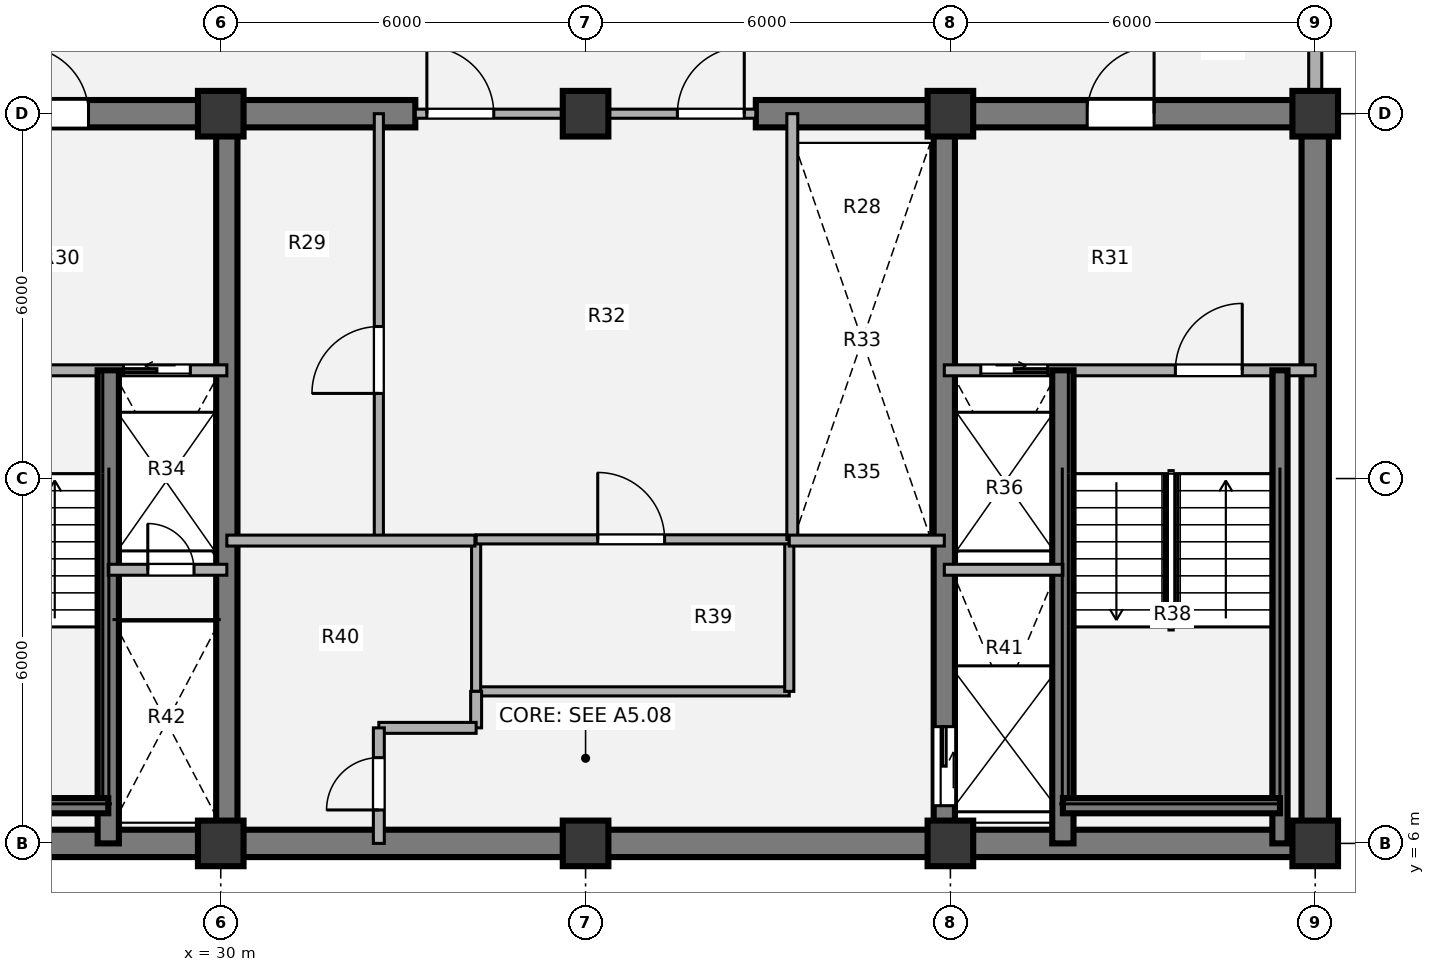
"""IFC4 building model, lengths in metres.
Left out: names, types, materials, properties, quantities, classifications, styles, units other than length and angle.
Written with IfcOpenShell. Run it as: python <this file> out.ifc"""

import sys

from ifc_helpers import new_model, si_unit, direction, frame, frame_2d, origin, origin_2d, place, context, subcontext, project, spatial, rectangle, extrude, source, transform, mapped, element, fill, save


model = new_model("IFC4")
c1 = context("Model", 3, precision=1e-05, world=origin(), true_north=direction((0.0, 1.0)))
c2 = subcontext(c1, "Body", "Model", "MODEL_VIEW")
j1 = project(units=[si_unit("LENGTHUNIT", "METRE"), si_unit("PLANEANGLEUNIT", "RADIAN")], contexts=[c1])
p1 = place(None, origin())
s1 = spatial("IfcSite", under=j1, at=p1, CompositionType="ELEMENT")
p2 = place(p1, origin())
s2 = spatial("IfcBuilding", under=s1, at=p2, CompositionType="ELEMENT")
p3 = place(p2, frame((0.0, 0.0, 201.78)))
s3 = spatial("IfcBuildingStorey", under=s2, at=p3, CompositionType="ELEMENT", Elevation=201.78)
m1 = source(origin(), c2, "Body", "SweptSolid", [
    extrude(rectangle(XDim=0.75, YDim=0.75, at=origin_2d()), origin(), (0.0, 0.0, 1.0), 3.78),
])
for number, where, z_axis, x_axis in (
    (1, (30.0, 6.0, 0.0), (0.0, 0.0, 1.0), (1.0, 0.0, 0.0)),
    (2, (36.0, 6.0, 0.0), (0.0, 0.0, 1.0), (1.0, 0.0, 0.0)),
    (3, (42.0, 6.0, 0.0), (0.0, 0.0, 1.0), (1.0, 0.0, 0.0)),
    (4, (48.0, 6.0, 0.0), (0.0, 0.0, 1.0), (1.0, 0.0, 0.0)),
    (5, (30.0, 18.0, 0.0), (0.0, 0.0, 1.0), (1.0, 0.0, 0.0)),
    (6, (36.0, 18.0, 0.0), (0.0, 0.0, 1.0), (1.0, 0.0, 0.0)),
    (7, (42.0, 18.0, 0.0), (0.0, 0.0, 1.0), (1.0, 0.0, 0.0)),
    (8, (48.0, 18.0, 0.0), (0.0, 0.0, 1.0), (1.0, 0.0, 0.0)),
):
    element("IfcColumn", number, at=place(p3, frame(where, z_axis=z_axis, x_axis=x_axis)), inside=s3, PredefinedType="COLUMN", context=c2, shape_type="MappedRepresentation", body=[
        mapped(m1, transform((0.0, 0.0, 0.0), x_axis=(1.0, 0.0, 0.0), y_axis=(0.0, 1.0, 0.0), z_axis=(0.0, 0.0, 1.0), scale=1.0)),
    ])
p4 = place(p3, frame((48.225, 6.0, 0.0), z_axis=(0.0, 0.0, 1.0), x_axis=(-1.0, 0.0, 0.0)))
e9 = element("IfcWall", 9, at=p4, inside=s3, PredefinedType="SHEAR", context=c2, shape_type="SweptSolid", body=[
    extrude(rectangle(XDim=24.45, YDim=0.45, at=frame_2d((12.225, 0.0))), origin(), (0.0, 0.0, 1.0), 3.78),
])
p5 = place(p3, frame((48.0, 18.0, 0.0), z_axis=(0.0, 0.0, 1.0), x_axis=(0.0, -1.0, 0.0)))
e10 = element("IfcWall", 10, at=p5, inside=s3, PredefinedType="SHEAR", context=c2, shape_type="SweptSolid", body=[
    extrude(rectangle(XDim=12.0, YDim=0.45, at=frame_2d((6.0, 0.0))), origin(), (0.0, 0.0, 1.0), 3.78),
])
p6 = place(p3, frame((23.775, 18.0, 0.0), z_axis=(0.0, 0.0, 1.0), x_axis=(1.0, 0.0, 0.0)))
e11 = element("IfcWall", 11, at=p6, inside=s3, PredefinedType="SHEAR", context=c2, shape_type="SweptSolid", body=[
    extrude(rectangle(XDim=9.425, YDim=0.45, at=frame_2d((4.712, 0.0))), origin(), (0.0, 0.0, 1.0), 3.78),
])
p7 = place(p6, frame((2.95, 0.0, 0.0)))
e12 = element("IfcOpeningElement", 12, at=p7, cuts=e11, PredefinedType="OPENING", context=c2, shape_type="SweptSolid", body=[
    extrude(rectangle(XDim=1.1, YDim=2.1, at=origin_2d()), frame((0.55, 0.235, 1.05), z_axis=(0.0, -1.0, 0.0), x_axis=(1.0, 0.0, 0.0)), (0.0, 0.0, 1.0), 0.47),
])
p8 = place(p3, frame((38.8, 18.0, 0.0), z_axis=(0.0, 0.0, 1.0), x_axis=(1.0, 0.0, 0.0)))
e13 = element("IfcWall", 13, at=p8, inside=s3, PredefinedType="SHEAR", context=c2, shape_type="SweptSolid", body=[
    extrude(rectangle(XDim=9.425, YDim=0.45, at=frame_2d((4.712, 0.0))), origin(), (0.0, 0.0, 1.0), 3.78),
])
p9 = place(p8, frame((5.45, 0.0, 0.0)))
e14 = element("IfcOpeningElement", 14, at=p9, cuts=e13, PredefinedType="OPENING", context=c2, shape_type="SweptSolid", body=[
    extrude(rectangle(XDim=1.1, YDim=2.1, at=origin_2d()), frame((0.55, 0.235, 1.05), z_axis=(0.0, -1.0, 0.0), x_axis=(1.0, 0.0, 0.0)), (0.0, 0.0, 1.0), 0.47),
])
p10 = place(p3, frame((30.1, 6.0, 0.0), z_axis=(0.0, 0.0, 1.0), x_axis=(0.0, 1.0, 0.0)))
e15 = element("IfcWall", 15, at=p10, inside=s3, PredefinedType="SHEAR", context=c2, shape_type="SweptSolid", body=[
    extrude(rectangle(XDim=12.0, YDim=0.35, at=frame_2d((6.0, 0.0))), origin(), (0.0, 0.0, 1.0), 3.78),
])
p11 = place(p3, frame((41.9, 18.0, 0.0), z_axis=(0.0, 0.0, 1.0), x_axis=(0.0, -1.0, 0.0)))
e16 = element("IfcWall", 16, at=p11, inside=s3, PredefinedType="SHEAR", context=c2, shape_type="SweptSolid", body=[
    extrude(rectangle(XDim=12.0, YDim=0.35, at=frame_2d((6.0, 0.0))), origin(), (0.0, 0.0, 1.0), 3.78),
])
p12 = place(p11, frame((10.08, 0.0, 0.0)))
e17 = element("IfcOpeningElement", 17, at=p12, cuts=e16, PredefinedType="OPENING", context=c2, shape_type="SweptSolid", body=[
    extrude(rectangle(XDim=1.3, YDim=2.1, at=origin_2d()), frame((0.65, 0.185, 1.05), z_axis=(0.0, -1.0, 0.0), x_axis=(1.0, 0.0, 0.0)), (0.0, 0.0, 1.0), 0.37),
])
p13 = place(p3, frame((48.0, 21.05, 0.0), z_axis=(0.0, 0.0, 1.0), x_axis=(0.0, -1.0, 0.0)))
e18 = element("IfcWall", 18, at=p13, inside=s3, PredefinedType="SOLIDWALL", context=c2, shape_type="SweptSolid", body=[
    extrude(rectangle(XDim=2.695, YDim=0.215, at=frame_2d((1.348, 0.0))), origin(), (0.0, 0.0, 1.0), 2.718),
])
p14 = place(p3, frame((32.6, 11.0, 0.0), z_axis=(0.0, 0.0, 1.0), x_axis=(0.0, 1.0, 0.0)))
e19 = element("IfcWall", 19, at=p14, inside=s3, PredefinedType="PARTITIONING", context=c2, shape_type="SweptSolid", body=[
    extrude(rectangle(XDim=7.0, YDim=0.15, at=frame_2d((3.5, 0.0))), origin(), (0.0, 0.0, 1.0), 3.5),
])
p15 = place(p14, frame((2.4, 0.0, 0.0)))
e20 = element("IfcOpeningElement", 20, at=p15, cuts=e19, PredefinedType="OPENING", context=c2, shape_type="SweptSolid", body=[
    extrude(rectangle(XDim=1.1, YDim=2.1, at=origin_2d()), frame((0.55, 0.085, 1.05), z_axis=(0.0, -1.0, 0.0), x_axis=(1.0, 0.0, 0.0)), (0.0, 0.0, 1.0), 0.17),
])
p16 = place(p3, frame((34.2, 8.5, 0.0), z_axis=(0.0, 0.0, 1.0), x_axis=(1.0, 0.0, 0.0)))
e21 = element("IfcWall", 21, at=p16, inside=s3, PredefinedType="PARTITIONING", context=c2, shape_type="SweptSolid", body=[
    extrude(rectangle(XDim=5.15, YDim=0.15, at=frame_2d((2.575, 0.0))), origin(), (0.0, 0.0, 1.0), 3.5),
])
for number, where, z_axis, x_axis in (
    (22, (34.2, 8.5, 0.0), (0.0, 0.0, 1.0), (0.0, 1.0, 0.0)),
    (23, (39.35, 8.5, 0.0), (0.0, 0.0, 1.0), (0.0, 1.0, 0.0)),
):
    element("IfcWall", number, at=place(p3, frame(where, z_axis=z_axis, x_axis=x_axis)), inside=s3, PredefinedType="PARTITIONING", context=c2, shape_type="SweptSolid", body=[
        extrude(rectangle(XDim=2.5, YDim=0.15, at=frame_2d((1.25, 0.0))), origin(), (0.0, 0.0, 1.0), 3.5),
    ])
p17 = place(p3, frame((34.2, 11.0, 0.0), z_axis=(0.0, 0.0, 1.0), x_axis=(1.0, 0.0, 0.0)))
e24 = element("IfcWall", 24, at=p17, inside=s3, PredefinedType="PARTITIONING", context=c2, shape_type="SweptSolid", body=[
    extrude(rectangle(XDim=5.15, YDim=0.15, at=frame_2d((2.575, 0.0))), origin(), (0.0, 0.0, 1.0), 3.5),
])
p18 = place(p17, frame((2.0, 0.0, 0.0)))
e25 = element("IfcOpeningElement", 25, at=p18, cuts=e24, PredefinedType="OPENING", context=c2, shape_type="SweptSolid", body=[
    extrude(rectangle(XDim=1.1, YDim=2.1, at=origin_2d()), frame((0.55, 0.085, 1.05), z_axis=(0.0, -1.0, 0.0), x_axis=(1.0, 0.0, 0.0)), (0.0, 0.0, 1.0), 0.17),
])
p19 = place(p3, frame((39.4, 11.0, 0.0), z_axis=(0.0, 0.0, 1.0), x_axis=(0.0, 1.0, 0.0)))
e26 = element("IfcWall", 26, at=p19, inside=s3, PredefinedType="PARTITIONING", context=c2, shape_type="SweptSolid", body=[
    extrude(rectangle(XDim=7.0, YDim=0.18, at=frame_2d((3.5, 0.0))), origin(), (0.0, 0.0, 1.0), 3.5),
])
p20 = place(p3, frame((30.1, 10.98, 0.0), z_axis=(0.0, 0.0, 1.0), x_axis=(1.0, 0.0, 0.0)))
e27 = element("IfcWall", 27, at=p20, inside=s3, PredefinedType="PARTITIONING", context=c2, shape_type="SweptSolid", body=[
    extrude(rectangle(XDim=4.08, YDim=0.18, at=frame_2d((2.04, 0.0))), origin(), (0.0, 0.0, 1.0), 3.5),
])
p21 = place(p3, frame((34.2, 7.9, 0.0), z_axis=(0.0, 0.0, 1.0), x_axis=(0.0, 1.0, 0.0)))
e28 = element("IfcWall", 28, at=p21, inside=s3, PredefinedType="PARTITIONING", context=c2, shape_type="SweptSolid", body=[
    extrude(rectangle(XDim=0.6, YDim=0.18, at=frame_2d((0.3, 0.0))), origin(), (0.0, 0.0, 1.0), 3.5),
])
p22 = place(p3, frame((32.6, 7.9, 0.0), z_axis=(0.0, 0.0, 1.0), x_axis=(1.0, 0.0, 0.0)))
e29 = element("IfcWall", 29, at=p22, inside=s3, PredefinedType="PARTITIONING", context=c2, shape_type="SweptSolid", body=[
    extrude(rectangle(XDim=1.6, YDim=0.18, at=frame_2d((0.8, 0.0))), origin(), (0.0, 0.0, 1.0), 3.5),
])
p23 = place(p3, frame((32.6, 6.0, 0.0), z_axis=(0.0, 0.0, 1.0), x_axis=(0.0, 1.0, 0.0)))
e30 = element("IfcWall", 30, at=p23, inside=s3, PredefinedType="PARTITIONING", context=c2, shape_type="SweptSolid", body=[
    extrude(rectangle(XDim=1.9, YDim=0.18, at=frame_2d((0.95, 0.0))), origin(), (0.0, 0.0, 1.0), 3.5),
])
p24 = place(p23, frame((0.55, 0.0, 0.0)))
e31 = element("IfcOpeningElement", 31, at=p24, cuts=e30, PredefinedType="OPENING", context=c2, shape_type="SweptSolid", body=[
    extrude(rectangle(XDim=0.86, YDim=2.1, at=origin_2d()), frame((0.43, 0.1, 1.05), z_axis=(0.0, -1.0, 0.0), x_axis=(1.0, 0.0, 0.0)), (0.0, 0.0, 1.0), 0.2),
])
p25 = place(p3, frame((39.35, 10.98, 0.0), z_axis=(0.0, 0.0, 1.0), x_axis=(1.0, 0.0, 0.0)))
e32 = element("IfcWall", 32, at=p25, inside=s3, PredefinedType="PARTITIONING", context=c2, shape_type="SweptSolid", body=[
    extrude(rectangle(XDim=2.55, YDim=0.18, at=frame_2d((1.275, 0.0))), origin(), (0.0, 0.0, 1.0), 3.5),
])
p26 = place(p3, frame((33.2, 18.0, 0.0), z_axis=(0.0, 0.0, 1.0), x_axis=(1.0, 0.0, 0.0)))
e33 = element("IfcWall", 33, at=p26, inside=s3, PredefinedType="PARTITIONING", context=c2, shape_type="SweptSolid", body=[
    extrude(rectangle(XDim=5.6, YDim=0.15, at=frame_2d((2.8, 0.0))), origin(), (0.0, 0.0, 1.0), 2.515),
])
p27 = place(p26, frame((0.19, 0.0, 0.0)))
e34 = element("IfcOpeningElement", 34, at=p27, cuts=e33, PredefinedType="OPENING", context=c2, shape_type="SweptSolid", body=[
    extrude(rectangle(XDim=1.1, YDim=2.1, at=origin_2d()), frame((0.55, 0.085, 1.05), z_axis=(0.0, -1.0, 0.0), x_axis=(1.0, 0.0, 0.0)), (0.0, 0.0, 1.0), 0.17),
])
p28 = place(p26, frame((4.31, 0.0, 0.0)))
e35 = element("IfcOpeningElement", 35, at=p28, cuts=e33, PredefinedType="OPENING", context=c2, shape_type="SweptSolid", body=[
    extrude(rectangle(XDim=1.1, YDim=2.1, at=origin_2d()), frame((0.55, 0.085, 1.05), z_axis=(0.0, -1.0, 0.0), x_axis=(1.0, 0.0, 0.0)), (0.0, 0.0, 1.0), 0.17),
])
p29 = place(p3, frame((24.0, 13.78, 0.0), z_axis=(0.0, 0.0, 1.0), x_axis=(1.0, 0.0, 0.0)))
e36 = element("IfcWall", 36, at=p29, inside=s3, PredefinedType="PARTITIONING", context=c2, shape_type="SweptSolid", body=[
    extrude(rectangle(XDim=6.1, YDim=0.18, at=frame_2d((3.05, 0.0))), origin(), (0.0, 0.0, 1.0), 3.5),
])
p30 = place(p29, frame((1.15, 0.0, 0.0)))
e37 = element("IfcOpeningElement", 37, at=p30, cuts=e36, PredefinedType="OPENING", context=c2, shape_type="SweptSolid", body=[
    extrude(rectangle(XDim=1.1, YDim=2.1, at=origin_2d()), frame((0.55, 0.1, 1.05), z_axis=(0.0, -1.0, 0.0), x_axis=(1.0, 0.0, 0.0)), (0.0, 0.0, 1.0), 0.2),
])
p31 = place(p29, frame((4.4, 0.0, 0.0)))
e38 = element("IfcOpeningElement", 38, at=p31, cuts=e36, PredefinedType="OPENING", context=c2, shape_type="SweptSolid", body=[
    extrude(rectangle(XDim=1.1, YDim=2.1, at=origin_2d()), frame((0.55, 0.1, 1.05), z_axis=(0.0, -1.0, 0.0), x_axis=(1.0, 0.0, 0.0)), (0.0, 0.0, 1.0), 0.2),
])
p32 = place(p3, frame((28.15, 6.0, 0.0), z_axis=(0.0, 0.0, 1.0), x_axis=(0.0, 1.0, 0.0)))
e39 = element("IfcWall", 39, at=p32, inside=s3, PredefinedType="SHEAR", context=c2, shape_type="SweptSolid", body=[
    extrude(rectangle(XDim=7.78, YDim=0.35, at=frame_2d((3.89, 0.0))), origin(), (0.0, 0.0, 1.0), 3.85),
])
p33 = place(p3, frame((24.58, 6.62, 0.0), z_axis=(0.0, 0.0, 1.0), x_axis=(1.0, 0.0, 0.0)))
e40 = element("IfcWall", 40, at=p33, inside=s3, PredefinedType="SHEAR", context=c2, shape_type="SweptSolid", body=[
    extrude(rectangle(XDim=3.57, YDim=0.25, at=frame_2d((1.785, 0.0))), origin(), (0.0, 0.0, 1.0), 3.85),
])
p34 = place(p3, frame((28.15, 10.5, 0.0), z_axis=(0.0, 0.0, 1.0), x_axis=(1.0, 0.0, 0.0)))
e41 = element("IfcWall", 41, at=p34, inside=s3, PredefinedType="PARTITIONING", context=c2, shape_type="SweptSolid", body=[
    extrude(rectangle(XDim=1.95, YDim=0.18, at=frame_2d((0.975, 0.0))), origin(), (0.0, 0.0, 1.0), 3.5),
])
p35 = place(p34, frame((0.65, 0.0, 0.0)))
e42 = element("IfcOpeningElement", 42, at=p35, cuts=e41, PredefinedType="OPENING", context=c2, shape_type="SweptSolid", body=[
    extrude(rectangle(XDim=0.76, YDim=2.05, at=origin_2d()), frame((0.38, 0.1, 1.025), z_axis=(0.0, -1.0, 0.0), x_axis=(1.0, 0.0, 0.0)), (0.0, 0.0, 1.0), 0.2),
])
p36 = place(p3, frame((41.9, 13.78, 0.0), z_axis=(0.0, 0.0, 1.0), x_axis=(1.0, 0.0, 0.0)))
e43 = element("IfcWall", 43, at=p36, inside=s3, PredefinedType="PARTITIONING", context=c2, shape_type="SweptSolid", body=[
    extrude(rectangle(XDim=6.1, YDim=0.18, at=frame_2d((3.05, 0.0))), origin(), (0.0, 0.0, 1.0), 3.5),
])
p37 = place(p36, frame((0.6, 0.0, 0.0)))
e44 = element("IfcOpeningElement", 44, at=p37, cuts=e43, PredefinedType="OPENING", context=c2, shape_type="SweptSolid", body=[
    extrude(rectangle(XDim=1.1, YDim=2.1, at=origin_2d()), frame((0.55, 0.1, 1.05), z_axis=(0.0, -1.0, 0.0), x_axis=(1.0, 0.0, 0.0)), (0.0, 0.0, 1.0), 0.2),
])
p38 = place(p36, frame((3.8, 0.0, 0.0)))
e45 = element("IfcOpeningElement", 45, at=p38, cuts=e43, PredefinedType="OPENING", context=c2, shape_type="SweptSolid", body=[
    extrude(rectangle(XDim=1.1, YDim=2.1, at=origin_2d()), frame((0.55, 0.1, 1.05), z_axis=(0.0, -1.0, 0.0), x_axis=(1.0, 0.0, 0.0)), (0.0, 0.0, 1.0), 0.2),
])
p39 = place(p3, frame((43.85, 6.0, 0.0), z_axis=(0.0, 0.0, 1.0), x_axis=(0.0, 1.0, 0.0)))
e46 = element("IfcWall", 46, at=p39, inside=s3, PredefinedType="SHEAR", context=c2, shape_type="SweptSolid", body=[
    extrude(rectangle(XDim=7.78, YDim=0.35, at=frame_2d((3.89, 0.0))), origin(), (0.0, 0.0, 1.0), 3.85),
])
p40 = place(p3, frame((47.42, 6.0, 0.0), z_axis=(0.0, 0.0, 1.0), x_axis=(0.0, 1.0, 0.0)))
e47 = element("IfcWall", 47, at=p40, inside=s3, PredefinedType="SHEAR", context=c2, shape_type="SweptSolid", body=[
    extrude(rectangle(XDim=7.78, YDim=0.25, at=frame_2d((3.89, 0.0))), origin(), (0.0, 0.0, 1.0), 3.85),
])
p41 = place(p3, frame((43.85, 6.62, 0.0), z_axis=(0.0, 0.0, 1.0), x_axis=(1.0, 0.0, 0.0)))
e48 = element("IfcWall", 48, at=p41, inside=s3, PredefinedType="SHEAR", context=c2, shape_type="SweptSolid", body=[
    extrude(rectangle(XDim=3.57, YDim=0.25, at=frame_2d((1.785, 0.0))), origin(), (0.0, 0.0, 1.0), 3.85),
])
p42 = place(p3, frame((41.9, 10.5, 0.0), z_axis=(0.0, 0.0, 1.0), x_axis=(1.0, 0.0, 0.0)))
e49 = element("IfcWall", 49, at=p42, inside=s3, PredefinedType="PARTITIONING", context=c2, shape_type="SweptSolid", body=[
    extrude(rectangle(XDim=1.95, YDim=0.18, at=frame_2d((0.975, 0.0))), origin(), (0.0, 0.0, 1.0), 3.5),
])
m2 = source(origin(), c2, "Body", "SweptSolid", [
    extrude(rectangle(XDim=1.1, YDim=2.1, at=origin_2d()), frame((0.55, 0.025, 1.05), z_axis=(0.0, -1.0, 0.0), x_axis=(1.0, 0.0, 0.0)), (0.0, 0.0, 1.0), 0.05),
])
p43 = place(p15, origin())
e50 = element("IfcDoor", 50, at=p43, inside=s3, OperationType="SINGLE_SWING_LEFT", PredefinedType="DOOR", context=c2, shape_type="MappedRepresentation", body=[
    mapped(m2, transform((0.0, 0.0, 0.0), x_axis=(1.0, 0.0, 0.0), y_axis=(0.0, 1.0, 0.0), z_axis=(0.0, 0.0, 1.0), scale=1.0)),
])
fill(e20, e50)
p44 = place(p18, origin())
e51 = element("IfcDoor", 51, at=p44, inside=s3, OperationType="SINGLE_SWING_LEFT", PredefinedType="DOOR", context=c2, shape_type="MappedRepresentation", body=[
    mapped(m2, transform((0.0, 0.0, 0.0), x_axis=(1.0, 0.0, 0.0), y_axis=(0.0, 1.0, 0.0), z_axis=(0.0, 0.0, 1.0), scale=1.0)),
])
fill(e25, e51)
m3 = source(origin(), c2, "Body", "SweptSolid", [
    extrude(rectangle(XDim=0.86, YDim=2.1, at=origin_2d()), frame((0.43, 0.025, 1.05), z_axis=(0.0, -1.0, 0.0), x_axis=(1.0, 0.0, 0.0)), (0.0, 0.0, 1.0), 0.05),
])
p45 = place(p24, origin())
e52 = element("IfcDoor", 52, at=p45, inside=s3, OperationType="SINGLE_SWING_LEFT", PredefinedType="DOOR", context=c2, shape_type="MappedRepresentation", body=[
    mapped(m3, transform((0.0, 0.0, 0.0), x_axis=(1.0, 0.0, 0.0), y_axis=(0.0, 1.0, 0.0), z_axis=(0.0, 0.0, 1.0), scale=1.0)),
])
fill(e31, e52)
m4 = source(origin(), c2, "Body", "SweptSolid", [
    extrude(rectangle(XDim=1.1, YDim=2.1, at=origin_2d()), frame((0.55, 0.025, 1.05), z_axis=(0.0, -1.0, 0.0), x_axis=(1.0, 0.0, 0.0)), (0.0, 0.0, 1.0), 0.05),
])
p46 = place(p27, origin())
e53 = element("IfcDoor", 53, at=p46, inside=s3, OperationType="SINGLE_SWING_LEFT", PredefinedType="DOOR", context=c2, shape_type="MappedRepresentation", body=[
    mapped(m4, transform((0.0, 0.0, 0.0), x_axis=(1.0, 0.0, 0.0), y_axis=(0.0, 1.0, 0.0), z_axis=(0.0, 0.0, 1.0), scale=1.0)),
])
fill(e34, e53)
p47 = place(p28, origin())
e54 = element("IfcDoor", 54, at=p47, inside=s3, OperationType="SINGLE_SWING_RIGHT", PredefinedType="DOOR", context=c2, shape_type="MappedRepresentation", body=[
    mapped(m4, transform((0.0, 0.0, 0.0), x_axis=(1.0, 0.0, 0.0), y_axis=(0.0, 1.0, 0.0), z_axis=(0.0, 0.0, 1.0), scale=1.0)),
])
fill(e35, e54)
m5 = source(origin(), c2, "Body", "SweptSolid", [
    extrude(rectangle(XDim=1.1, YDim=2.1, at=origin_2d()), frame((0.55, 0.025, 1.05), z_axis=(0.0, -1.0, 0.0), x_axis=(1.0, 0.0, 0.0)), (0.0, 0.0, 1.0), 0.05),
])
p48 = place(p31, origin())
e55 = element("IfcDoor", 55, at=p48, inside=s3, OperationType="SLIDING_TO_LEFT", PredefinedType="DOOR", context=c2, shape_type="MappedRepresentation", body=[
    mapped(m5, transform((0.0, 0.0, 0.0), x_axis=(1.0, 0.0, 0.0), y_axis=(0.0, 1.0, 0.0), z_axis=(0.0, 0.0, 1.0), scale=1.0)),
])
fill(e38, e55)
m6 = source(origin(), c2, "Body", "SweptSolid", [
    extrude(rectangle(XDim=0.76, YDim=2.05, at=origin_2d()), frame((0.38, 0.025, 1.025), z_axis=(0.0, -1.0, 0.0), x_axis=(1.0, 0.0, 0.0)), (0.0, 0.0, 1.0), 0.05),
])
p49 = place(p35, origin())
e56 = element("IfcDoor", 56, at=p49, inside=s3, OperationType="SINGLE_SWING_LEFT", PredefinedType="DOOR", context=c2, shape_type="MappedRepresentation", body=[
    mapped(m6, transform((0.0, 0.0, 0.0), x_axis=(1.0, 0.0, 0.0), y_axis=(0.0, 1.0, 0.0), z_axis=(0.0, 0.0, 1.0), scale=1.0)),
])
fill(e42, e56)
p50 = place(p37, origin())
e57 = element("IfcDoor", 57, at=p50, inside=s3, OperationType="SLIDING_TO_RIGHT", PredefinedType="DOOR", context=c2, shape_type="MappedRepresentation", body=[
    mapped(m5, transform((0.0, 0.0, 0.0), x_axis=(1.0, 0.0, 0.0), y_axis=(0.0, 1.0, 0.0), z_axis=(0.0, 0.0, 1.0), scale=1.0)),
])
fill(e44, e57)
m7 = source(origin(), c2, "Body", "SweptSolid", [
    extrude(rectangle(XDim=1.1, YDim=2.1, at=origin_2d()), frame((0.55, 0.025, 1.05), z_axis=(0.0, -1.0, 0.0), x_axis=(1.0, 0.0, 0.0)), (0.0, 0.0, 1.0), 0.05),
])
p51 = place(p38, origin())
e58 = element("IfcDoor", 58, at=p51, inside=s3, OperationType="SINGLE_SWING_RIGHT", PredefinedType="DOOR", context=c2, shape_type="MappedRepresentation", body=[
    mapped(m7, transform((0.0, 0.0, 0.0), x_axis=(1.0, 0.0, 0.0), y_axis=(0.0, 1.0, 0.0), z_axis=(0.0, 0.0, 1.0), scale=1.0)),
])
fill(e45, e58)
m8 = source(origin(), c2, "Body", "SweptSolid", [
    extrude(rectangle(XDim=1.3, YDim=2.1, at=origin_2d()), frame((0.65, 0.025, 1.05), z_axis=(0.0, -1.0, 0.0), x_axis=(1.0, 0.0, 0.0)), (0.0, 0.0, 1.0), 0.05),
])
p52 = place(p12, origin())
e59 = element("IfcDoor", 59, at=p52, inside=s3, OperationType="SLIDING_TO_LEFT", PredefinedType="DOOR", context=c2, shape_type="MappedRepresentation", body=[
    mapped(m8, transform((0.0, 0.0, 0.0), x_axis=(1.0, 0.0, 0.0), y_axis=(0.0, 1.0, 0.0), z_axis=(0.0, 0.0, 1.0), scale=1.0)),
])
fill(e17, e59)
p53 = place(p7, origin())
e60 = element("IfcDoor", 60, at=p53, inside=s3, OperationType="SINGLE_SWING_LEFT", PredefinedType="DOOR", context=c2, shape_type="MappedRepresentation", body=[
    mapped(m4, transform((0.0, 0.0, 0.0), x_axis=(1.0, 0.0, 0.0), y_axis=(0.0, 1.0, 0.0), z_axis=(0.0, 0.0, 1.0), scale=1.0)),
])
fill(e12, e60)
p54 = place(p9, origin())
e61 = element("IfcDoor", 61, at=p54, inside=s3, OperationType="SINGLE_SWING_RIGHT", PredefinedType="DOOR", context=c2, shape_type="MappedRepresentation", body=[
    mapped(m4, transform((0.0, 0.0, 0.0), x_axis=(1.0, 0.0, 0.0), y_axis=(0.0, 1.0, 0.0), z_axis=(0.0, 0.0, 1.0), scale=1.0)),
])
fill(e14, e61)
save(model, sys.argv[1])
